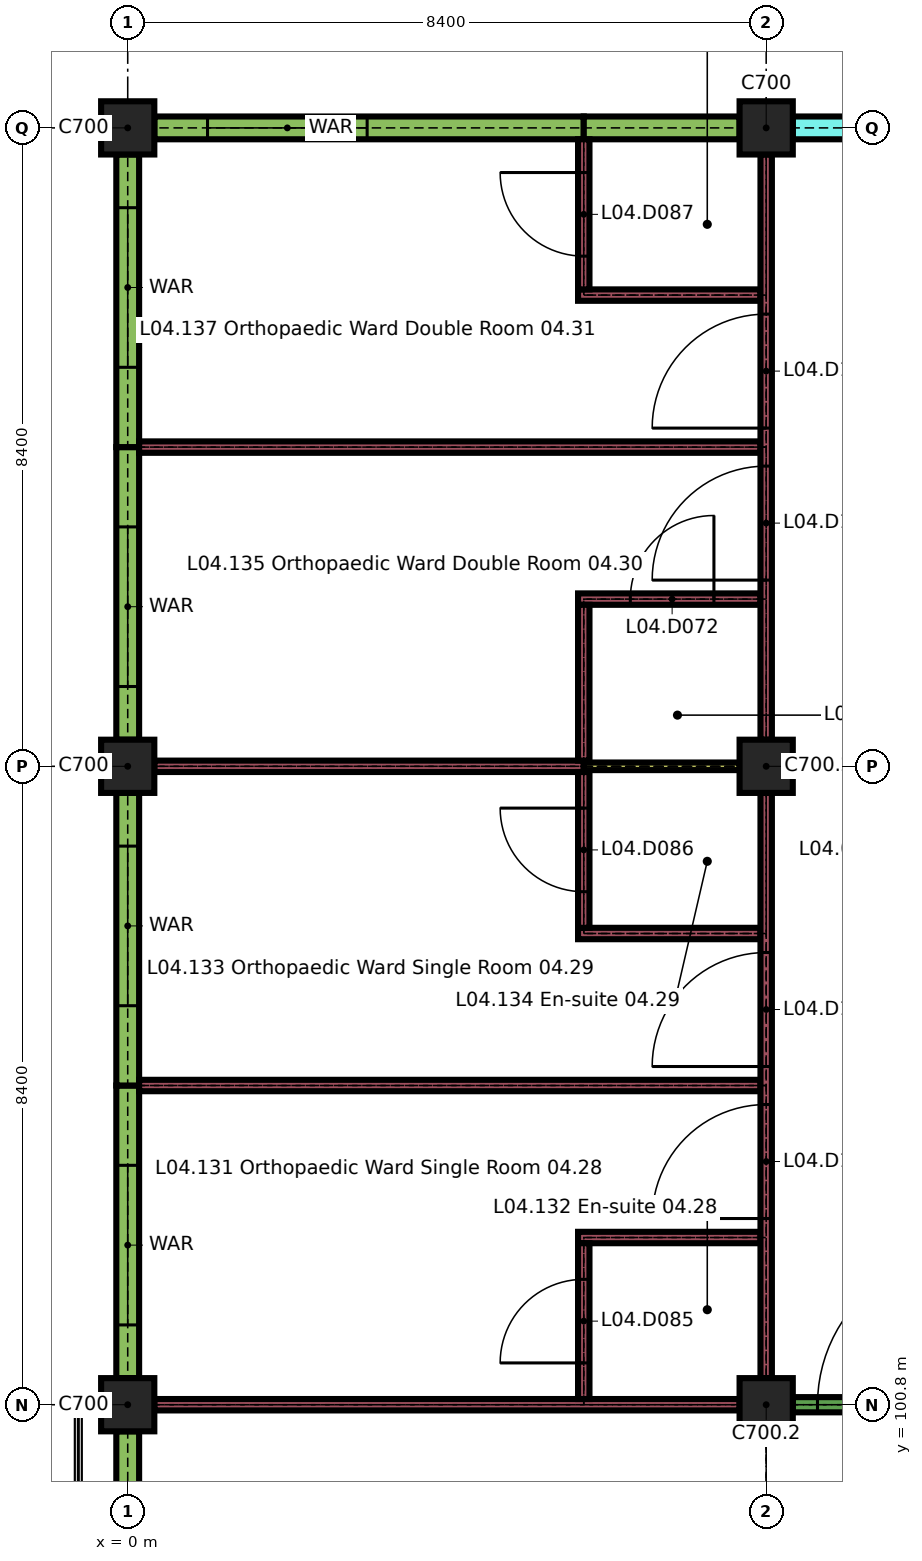
"""IFC4 building model, lengths in metres.
Left out: names, types, materials, properties, quantities, classifications, styles, units other than length and angle.
Written with IfcOpenShell. Run it as: python <this file> out.ifc"""

import sys

from ifc_helpers import new_model, si_unit, direction, frame, frame_2d, origin, origin_2d, place, context, subcontext, project, spatial, rectangle, extrude, element, fill, save


model = new_model("IFC4")
c1 = context("Model", 3, precision=1e-05, world=origin(), true_north=direction((0.0, 1.0)))
c2 = subcontext(c1, "Body", "Model", "MODEL_VIEW")
j1 = project(units=[si_unit("LENGTHUNIT", "METRE"), si_unit("PLANEANGLEUNIT", "RADIAN")], contexts=[c1])
p1 = place(None, origin())
s1 = spatial("IfcSite", under=j1, at=p1, CompositionType="ELEMENT")
p2 = place(p1, origin())
s2 = spatial("IfcBuilding", under=s1, at=p2, CompositionType="ELEMENT")
p3 = place(p2, frame((0.0, 0.0, 18.9)))
s3 = spatial("IfcBuildingStorey", under=s2, at=p3, CompositionType="ELEMENT", Elevation=18.9)
for number, where, z_axis, x_axis in (
    (1, (0.0, 100.8, 0.0), (0.0, 0.0, 1.0), (1.0, 0.0, 0.0)),
    (2, (8.4, 100.8, 0.0), (0.0, 0.0, 1.0), (1.0, 0.0, 0.0)),
    (3, (0.0, 109.2, 0.0), (0.0, 0.0, 1.0), (1.0, 0.0, 0.0)),
    (4, (8.4, 109.2, 0.0), (0.0, 0.0, 1.0), (1.0, 0.0, 0.0)),
    (5, (0.0, 117.6, 0.0), (0.0, 0.0, 1.0), (1.0, 0.0, 0.0)),
    (6, (8.4, 117.6, 0.0), (0.0, 0.0, 1.0), (1.0, 0.0, 0.0)),
):
    element("IfcColumn", number, at=place(p3, frame(where, z_axis=z_axis, x_axis=x_axis)), inside=s3, PredefinedType="COLUMN", context=c2, shape_type="SweptSolid", body=[
        extrude(rectangle(XDim=0.7, YDim=0.7, at=origin_2d()), origin(), (0.0, 0.0, 1.0), 3.26),
    ])
p4 = place(p3, frame((0.35, 117.6, 0.0), z_axis=(0.0, 0.0, 1.0), x_axis=(1.0, 0.0, 0.0)))
e7 = element("IfcWall", 7, at=p4, inside=s3, PredefinedType="SOLIDWALL", context=c2, shape_type="SweptSolid", body=[
    extrude(rectangle(XDim=5.65, YDim=0.3, at=frame_2d((2.825, 0.0))), origin(), (0.0, 0.0, 1.0), 2.96),
])
p5 = place(p4, frame((0.7, 0.0, 0.9)))
e8 = element("IfcOpeningElement", 8, at=p5, cuts=e7, PredefinedType="OPENING", context=c2, shape_type="SweptSolid", body=[
    extrude(rectangle(XDim=2.1, YDim=1.5, at=frame_2d((1.05, 0.75))), frame((0.0, 0.16, 0.0), z_axis=(0.0, -1.0, 0.0), x_axis=(1.0, 0.0, 0.0)), (0.0, 0.0, 1.0), 0.32),
])
p6 = place(p3, frame((6.0, 117.6, 0.0), z_axis=(0.0, 0.0, 1.0), x_axis=(1.0, 0.0, 0.0)))
e9 = element("IfcWall", 9, at=p6, inside=s3, PredefinedType="SOLIDWALL", context=c2, shape_type="SweptSolid", body=[
    extrude(rectangle(XDim=2.05, YDim=0.3, at=frame_2d((1.025, 0.0))), origin(), (0.0, 0.0, 1.0), 2.96),
])
p7 = place(p3, frame((8.75, 117.6, 0.0), z_axis=(0.0, 0.0, 1.0), x_axis=(1.0, 0.0, 0.0)))
e10 = element("IfcWall", 10, at=p7, inside=s3, PredefinedType="SOLIDWALL", context=c2, shape_type="SweptSolid", body=[
    extrude(rectangle(XDim=2.65, YDim=0.3, at=frame_2d((1.325, 0.0))), origin(), (0.0, 0.0, 1.0), 3.26),
])
p8 = place(p7, frame((1.3, 0.0, 0.9)))
e11 = element("IfcOpeningElement", 11, at=p8, cuts=e10, PredefinedType="OPENING", context=c2, shape_type="SweptSolid", body=[
    extrude(rectangle(XDim=0.9, YDim=1.5, at=frame_2d((0.45, 0.75))), frame((0.0, 0.16, 0.0), z_axis=(0.0, -1.0, 0.0), x_axis=(1.0, 0.0, 0.0)), (0.0, 0.0, 1.0), 0.32),
])
p9 = place(p3, frame((0.0, 99.4, 0.0), z_axis=(0.0, 0.0, 1.0), x_axis=(0.0, 1.0, 0.0)))
e12 = element("IfcWall", 12, at=p9, inside=s3, PredefinedType="SOLIDWALL", context=c2, shape_type="SweptSolid", body=[
    extrude(rectangle(XDim=1.05, YDim=0.3, at=frame_2d((0.525, 0.0))), origin(), (0.0, 0.0, 1.0), 2.96),
])
p10 = place(p3, frame((0.0, 101.15, 0.0), z_axis=(0.0, 0.0, 1.0), x_axis=(0.0, 1.0, 0.0)))
e13 = element("IfcWall", 13, at=p10, inside=s3, PredefinedType="SOLIDWALL", context=c2, shape_type="SweptSolid", body=[
    extrude(rectangle(XDim=3.85, YDim=0.3, at=frame_2d((1.925, 0.0))), origin(), (0.0, 0.0, 1.0), 2.96),
])
p11 = place(p10, frame((0.7, 0.0, 0.9)))
e14 = element("IfcOpeningElement", 14, at=p11, cuts=e13, PredefinedType="OPENING", context=c2, shape_type="SweptSolid", body=[
    extrude(rectangle(XDim=2.1, YDim=1.5, at=frame_2d((1.05, 0.75))), frame((0.0, 0.16, 0.0), z_axis=(0.0, -1.0, 0.0), x_axis=(1.0, 0.0, 0.0)), (0.0, 0.0, 1.0), 0.32),
])
p12 = place(p3, frame((0.0, 105.0, 0.0), z_axis=(0.0, 0.0, 1.0), x_axis=(0.0, 1.0, 0.0)))
e15 = element("IfcWall", 15, at=p12, inside=s3, PredefinedType="SOLIDWALL", context=c2, shape_type="SweptSolid", body=[
    extrude(rectangle(XDim=3.85, YDim=0.3, at=frame_2d((1.925, 0.0))), origin(), (0.0, 0.0, 1.0), 2.96),
])
p13 = place(p12, frame((1.05, 0.0, 0.9)))
e16 = element("IfcOpeningElement", 16, at=p13, cuts=e15, PredefinedType="OPENING", context=c2, shape_type="SweptSolid", body=[
    extrude(rectangle(XDim=2.1, YDim=1.5, at=frame_2d((1.05, 0.75))), frame((0.0, 0.16, 0.0), z_axis=(0.0, -1.0, 0.0), x_axis=(1.0, 0.0, 0.0)), (0.0, 0.0, 1.0), 0.32),
])
p14 = place(p3, frame((0.0, 109.55, 0.0), z_axis=(0.0, 0.0, 1.0), x_axis=(0.0, 1.0, 0.0)))
e17 = element("IfcWall", 17, at=p14, inside=s3, PredefinedType="SOLIDWALL", context=c2, shape_type="SweptSolid", body=[
    extrude(rectangle(XDim=3.85, YDim=0.3, at=frame_2d((1.925, 0.0))), origin(), (0.0, 0.0, 1.0), 2.96),
])
p15 = place(p14, frame((0.7, 0.0, 0.9)))
e18 = element("IfcOpeningElement", 18, at=p15, cuts=e17, PredefinedType="OPENING", context=c2, shape_type="SweptSolid", body=[
    extrude(rectangle(XDim=2.1, YDim=1.5, at=frame_2d((1.05, 0.75))), frame((0.0, 0.16, 0.0), z_axis=(0.0, -1.0, 0.0), x_axis=(1.0, 0.0, 0.0)), (0.0, 0.0, 1.0), 0.32),
])
p16 = place(p3, frame((0.0, 113.4, 0.0), z_axis=(0.0, 0.0, 1.0), x_axis=(0.0, 1.0, 0.0)))
e19 = element("IfcWall", 19, at=p16, inside=s3, PredefinedType="SOLIDWALL", context=c2, shape_type="SweptSolid", body=[
    extrude(rectangle(XDim=3.85, YDim=0.3, at=frame_2d((1.925, 0.0))), origin(), (0.0, 0.0, 1.0), 2.96),
])
p17 = place(p16, frame((1.05, 0.0, 0.9)))
e20 = element("IfcOpeningElement", 20, at=p17, cuts=e19, PredefinedType="OPENING", context=c2, shape_type="SweptSolid", body=[
    extrude(rectangle(XDim=2.1, YDim=1.5, at=frame_2d((1.05, 0.75))), frame((0.0, 0.16, 0.0), z_axis=(0.0, -1.0, 0.0), x_axis=(1.0, 0.0, 0.0)), (0.0, 0.0, 1.0), 0.32),
])
p18 = place(p3, frame((0.35, 100.8, 0.0), z_axis=(0.0, 0.0, 1.0), x_axis=(1.0, 0.0, 0.0)))
e21 = element("IfcWall", 21, at=p18, inside=s3, PredefinedType="PARTITIONING", context=c2, shape_type="SweptSolid", body=[
    extrude(rectangle(XDim=7.7, YDim=0.15, at=frame_2d((3.85, 0.0))), origin(), (0.0, 0.0, 1.0), 3.26),
])
p19 = place(p3, frame((8.75, 100.8, 0.0), z_axis=(0.0, 0.0, 1.0), x_axis=(1.0, 0.0, 0.0)))
e22 = element("IfcWall", 22, at=p19, inside=s3, PredefinedType="PARTITIONING", context=c2, shape_type="SweptSolid", body=[
    extrude(rectangle(XDim=7.7, YDim=0.2, at=frame_2d((3.85, 0.0))), origin(), (0.0, 0.0, 1.0), 3.26),
])
p20 = place(p19, frame((0.325, 0.0, 0.0)))
e23 = element("IfcOpeningElement", 23, at=p20, cuts=e22, PredefinedType="OPENING", context=c2, shape_type="SweptSolid", body=[
    extrude(rectangle(XDim=2.0, YDim=2.4, at=frame_2d((1.0, 1.2))), frame((0.0, 0.11, 0.0), z_axis=(0.0, -1.0, 0.0), x_axis=(1.0, 0.0, 0.0)), (0.0, 0.0, 1.0), 0.22),
])
p21 = place(p19, frame((5.375, 0.0, 0.0)))
e24 = element("IfcOpeningElement", 24, at=p21, cuts=e22, PredefinedType="OPENING", context=c2, shape_type="SweptSolid", body=[
    extrude(rectangle(XDim=2.0, YDim=2.4, at=frame_2d((1.0, 1.2))), frame((0.0, 0.11, 0.0), z_axis=(0.0, -1.0, 0.0), x_axis=(1.0, 0.0, 0.0)), (0.0, 0.0, 1.0), 0.22),
])
p22 = place(p3, frame((5.925, 103.0, 0.0), z_axis=(0.0, 0.0, 1.0), x_axis=(1.0, 0.0, 0.0)))
e25 = element("IfcWall", 25, at=p22, inside=s3, PredefinedType="PARTITIONING", context=c2, shape_type="SweptSolid", body=[
    extrude(rectangle(XDim=2.4, YDim=0.15, at=frame_2d((1.2, 0.0))), origin(), (0.0, 0.0, 1.0), 3.26),
])
p23 = place(p3, frame((0.15, 105.0, 0.0), z_axis=(0.0, 0.0, 1.0), x_axis=(1.0, 0.0, 0.0)))
e26 = element("IfcWall", 26, at=p23, inside=s3, PredefinedType="PARTITIONING", context=c2, shape_type="SweptSolid", body=[
    extrude(rectangle(XDim=8.175, YDim=0.15, at=frame_2d((4.087, 0.0))), origin(), (0.0, 0.0, 1.0), 3.26),
])
p24 = place(p3, frame((5.925, 107.0, 0.0), z_axis=(0.0, 0.0, 1.0), x_axis=(1.0, 0.0, 0.0)))
e27 = element("IfcWall", 27, at=p24, inside=s3, PredefinedType="PARTITIONING", context=c2, shape_type="SweptSolid", body=[
    extrude(rectangle(XDim=2.4, YDim=0.15, at=frame_2d((1.2, 0.0))), origin(), (0.0, 0.0, 1.0), 3.26),
])
p25 = place(p3, frame((0.35, 109.2, 0.0), z_axis=(0.0, 0.0, 1.0), x_axis=(1.0, 0.0, 0.0)))
e28 = element("IfcWall", 28, at=p25, inside=s3, PredefinedType="PARTITIONING", context=c2, shape_type="SweptSolid", body=[
    extrude(rectangle(XDim=5.65, YDim=0.15, at=frame_2d((2.825, 0.0))), origin(), (0.0, 0.0, 1.0), 3.26),
])
p26 = place(p3, frame((6.0, 109.2, 0.0), z_axis=(0.0, 0.0, 1.0), x_axis=(1.0, 0.0, 0.0)))
e29 = element("IfcWall", 29, at=p26, inside=s3, PredefinedType="PARTITIONING", context=c2, shape_type="SweptSolid", body=[
    extrude(rectangle(XDim=2.05, YDim=0.1, at=frame_2d((1.025, 0.0))), origin(), (0.0, 0.0, 1.0), 3.26),
])
p27 = place(p3, frame((5.925, 111.4, 0.0), z_axis=(0.0, 0.0, 1.0), x_axis=(1.0, 0.0, 0.0)))
e30 = element("IfcWall", 30, at=p27, inside=s3, PredefinedType="PARTITIONING", context=c2, shape_type="SweptSolid", body=[
    extrude(rectangle(XDim=2.4, YDim=0.15, at=frame_2d((1.2, 0.0))), origin(), (0.0, 0.0, 1.0), 3.26),
])
p28 = place(p27, frame((0.688, 0.0, 0.0)))
e31 = element("IfcOpeningElement", 31, at=p28, cuts=e30, PredefinedType="OPENING", context=c2, shape_type="SweptSolid", body=[
    extrude(rectangle(XDim=1.1, YDim=2.1, at=frame_2d((0.55, 1.05))), frame((0.0, 0.085, 0.0), z_axis=(0.0, -1.0, 0.0), x_axis=(1.0, 0.0, 0.0)), (0.0, 0.0, 1.0), 0.17),
])
p29 = place(p3, frame((0.15, 113.4, 0.0), z_axis=(0.0, 0.0, 1.0), x_axis=(1.0, 0.0, 0.0)))
e32 = element("IfcWall", 32, at=p29, inside=s3, PredefinedType="PARTITIONING", context=c2, shape_type="SweptSolid", body=[
    extrude(rectangle(XDim=8.175, YDim=0.15, at=frame_2d((4.087, 0.0))), origin(), (0.0, 0.0, 1.0), 3.26),
])
p30 = place(p3, frame((5.925, 115.4, 0.0), z_axis=(0.0, 0.0, 1.0), x_axis=(1.0, 0.0, 0.0)))
e33 = element("IfcWall", 33, at=p30, inside=s3, PredefinedType="PARTITIONING", context=c2, shape_type="SweptSolid", body=[
    extrude(rectangle(XDim=2.4, YDim=0.15, at=frame_2d((1.2, 0.0))), origin(), (0.0, 0.0, 1.0), 3.26),
])
p31 = place(p3, frame((6.0, 100.875, 0.0), z_axis=(0.0, 0.0, 1.0), x_axis=(0.0, 1.0, 0.0)))
e34 = element("IfcWall", 34, at=p31, inside=s3, PredefinedType="PARTITIONING", context=c2, shape_type="SweptSolid", body=[
    extrude(rectangle(XDim=2.05, YDim=0.15, at=frame_2d((1.025, 0.0))), origin(), (0.0, 0.0, 1.0), 3.26),
])
p32 = place(p31, frame((0.475, 0.0, 0.0)))
e35 = element("IfcOpeningElement", 35, at=p32, cuts=e34, PredefinedType="OPENING", context=c2, shape_type="SweptSolid", body=[
    extrude(rectangle(XDim=1.1, YDim=2.1, at=frame_2d((0.55, 1.05))), frame((0.0, 0.085, 0.0), z_axis=(0.0, -1.0, 0.0), x_axis=(1.0, 0.0, 0.0)), (0.0, 0.0, 1.0), 0.17),
])
p33 = place(p3, frame((6.0, 107.075, 0.0), z_axis=(0.0, 0.0, 1.0), x_axis=(0.0, 1.0, 0.0)))
e36 = element("IfcWall", 36, at=p33, inside=s3, PredefinedType="PARTITIONING", context=c2, shape_type="SweptSolid", body=[
    extrude(rectangle(XDim=2.05, YDim=0.15, at=frame_2d((1.025, 0.0))), origin(), (0.0, 0.0, 1.0), 3.26),
])
p34 = place(p33, frame((0.475, 0.0, 0.0)))
e37 = element("IfcOpeningElement", 37, at=p34, cuts=e36, PredefinedType="OPENING", context=c2, shape_type="SweptSolid", body=[
    extrude(rectangle(XDim=1.1, YDim=2.1, at=frame_2d((0.55, 1.05))), frame((0.0, 0.085, 0.0), z_axis=(0.0, -1.0, 0.0), x_axis=(1.0, 0.0, 0.0)), (0.0, 0.0, 1.0), 0.17),
])
p35 = place(p3, frame((6.0, 109.275, 0.0), z_axis=(0.0, 0.0, 1.0), x_axis=(0.0, 1.0, 0.0)))
e38 = element("IfcWall", 38, at=p35, inside=s3, PredefinedType="PARTITIONING", context=c2, shape_type="SweptSolid", body=[
    extrude(rectangle(XDim=2.05, YDim=0.15, at=frame_2d((1.025, 0.0))), origin(), (0.0, 0.0, 1.0), 3.26),
])
p36 = place(p3, frame((6.0, 115.475, 0.0), z_axis=(0.0, 0.0, 1.0), x_axis=(0.0, 1.0, 0.0)))
e39 = element("IfcWall", 39, at=p36, inside=s3, PredefinedType="PARTITIONING", context=c2, shape_type="SweptSolid", body=[
    extrude(rectangle(XDim=1.975, YDim=0.15, at=frame_2d((0.987, 0.0))), origin(), (0.0, 0.0, 1.0), 3.26),
])
p37 = place(p36, frame((0.438, 0.0, 0.0)))
e40 = element("IfcOpeningElement", 40, at=p37, cuts=e39, PredefinedType="OPENING", context=c2, shape_type="SweptSolid", body=[
    extrude(rectangle(XDim=1.1, YDim=2.1, at=frame_2d((0.55, 1.05))), frame((0.0, 0.085, 0.0), z_axis=(0.0, -1.0, 0.0), x_axis=(1.0, 0.0, 0.0)), (0.0, 0.0, 1.0), 0.17),
])
p38 = place(p3, frame((8.4, 101.15, 0.0), z_axis=(0.0, 0.0, 1.0), x_axis=(0.0, 1.0, 0.0)))
e41 = element("IfcWall", 41, at=p38, inside=s3, PredefinedType="PARTITIONING", context=c2, shape_type="SweptSolid", body=[
    extrude(rectangle(XDim=7.7, YDim=0.15, at=frame_2d((3.85, 0.0))), origin(), (0.0, 0.0, 1.0), 3.26),
])
p39 = place(p38, frame((2.1, 0.0, 0.0)))
e42 = element("IfcOpeningElement", 42, at=p39, cuts=e41, PredefinedType="OPENING", context=c2, shape_type="SweptSolid", body=[
    extrude(rectangle(XDim=1.5, YDim=2.4, at=frame_2d((0.75, 1.2))), frame((0.0, 0.085, 0.0), z_axis=(0.0, -1.0, 0.0), x_axis=(1.0, 0.0, 0.0)), (0.0, 0.0, 1.0), 0.17),
])
p40 = place(p38, frame((4.1, 0.0, 0.0)))
e43 = element("IfcOpeningElement", 43, at=p40, cuts=e41, PredefinedType="OPENING", context=c2, shape_type="SweptSolid", body=[
    extrude(rectangle(XDim=1.5, YDim=2.4, at=frame_2d((0.75, 1.2))), frame((0.0, 0.085, 0.0), z_axis=(0.0, -1.0, 0.0), x_axis=(1.0, 0.0, 0.0)), (0.0, 0.0, 1.0), 0.17),
])
p41 = place(p3, frame((8.4, 109.55, 0.0), z_axis=(0.0, 0.0, 1.0), x_axis=(0.0, 1.0, 0.0)))
e44 = element("IfcWall", 44, at=p41, inside=s3, PredefinedType="PARTITIONING", context=c2, shape_type="SweptSolid", body=[
    extrude(rectangle(XDim=7.7, YDim=0.15, at=frame_2d((3.85, 0.0))), origin(), (0.0, 0.0, 1.0), 3.26),
])
p42 = place(p41, frame((2.1, 0.0, 0.0)))
e45 = element("IfcOpeningElement", 45, at=p42, cuts=e44, PredefinedType="OPENING", context=c2, shape_type="SweptSolid", body=[
    extrude(rectangle(XDim=1.5, YDim=2.4, at=frame_2d((0.75, 1.2))), frame((0.0, 0.085, 0.0), z_axis=(0.0, -1.0, 0.0), x_axis=(1.0, 0.0, 0.0)), (0.0, 0.0, 1.0), 0.17),
])
p43 = place(p41, frame((4.1, 0.0, 0.0)))
e46 = element("IfcOpeningElement", 46, at=p43, cuts=e44, PredefinedType="OPENING", context=c2, shape_type="SweptSolid", body=[
    extrude(rectangle(XDim=1.5, YDim=2.4, at=frame_2d((0.75, 1.2))), frame((0.0, 0.085, 0.0), z_axis=(0.0, -1.0, 0.0), x_axis=(1.0, 0.0, 0.0)), (0.0, 0.0, 1.0), 0.17),
])
p44 = place(p5, origin())
e47 = element("IfcWindow", 47, at=p44, inside=s3, PartitioningType="DOUBLE_PANEL_VERTICAL", PredefinedType="WINDOW", context=c2, shape_type="SweptSolid", body=[
    extrude(rectangle(XDim=2.1, YDim=1.5, at=frame_2d((1.05, 0.75))), frame((0.0, 0.05, 0.0), z_axis=(0.0, -1.0, 0.0), x_axis=(1.0, 0.0, 0.0)), (0.0, 0.0, 1.0), 0.1),
])
fill(e8, e47)
p45 = place(p11, origin())
e48 = element("IfcWindow", 48, at=p45, inside=s3, PartitioningType="DOUBLE_PANEL_VERTICAL", PredefinedType="WINDOW", context=c2, shape_type="SweptSolid", body=[
    extrude(rectangle(XDim=2.1, YDim=1.5, at=frame_2d((1.05, 0.75))), frame((0.0, 0.05, 0.0), z_axis=(0.0, -1.0, 0.0), x_axis=(1.0, 0.0, 0.0)), (0.0, 0.0, 1.0), 0.1),
])
fill(e14, e48)
p46 = place(p13, origin())
e49 = element("IfcWindow", 49, at=p46, inside=s3, PartitioningType="DOUBLE_PANEL_VERTICAL", PredefinedType="WINDOW", context=c2, shape_type="SweptSolid", body=[
    extrude(rectangle(XDim=2.1, YDim=1.5, at=frame_2d((1.05, 0.75))), frame((0.0, 0.05, 0.0), z_axis=(0.0, -1.0, 0.0), x_axis=(1.0, 0.0, 0.0)), (0.0, 0.0, 1.0), 0.1),
])
fill(e16, e49)
p47 = place(p15, origin())
e50 = element("IfcWindow", 50, at=p47, inside=s3, PartitioningType="DOUBLE_PANEL_VERTICAL", PredefinedType="WINDOW", context=c2, shape_type="SweptSolid", body=[
    extrude(rectangle(XDim=2.1, YDim=1.5, at=frame_2d((1.05, 0.75))), frame((0.0, 0.05, 0.0), z_axis=(0.0, -1.0, 0.0), x_axis=(1.0, 0.0, 0.0)), (0.0, 0.0, 1.0), 0.1),
])
fill(e18, e50)
p48 = place(p17, origin())
e51 = element("IfcWindow", 51, at=p48, inside=s3, PartitioningType="DOUBLE_PANEL_VERTICAL", PredefinedType="WINDOW", context=c2, shape_type="SweptSolid", body=[
    extrude(rectangle(XDim=2.1, YDim=1.5, at=frame_2d((1.05, 0.75))), frame((0.0, 0.05, 0.0), z_axis=(0.0, -1.0, 0.0), x_axis=(1.0, 0.0, 0.0)), (0.0, 0.0, 1.0), 0.1),
])
fill(e20, e51)
p49 = place(p20, origin())
e52 = element("IfcDoor", 52, at=p49, inside=s3, OperationType="SINGLE_SWING_LEFT", PredefinedType="DOOR", context=c2, shape_type="SweptSolid", body=[
    extrude(rectangle(XDim=2.0, YDim=2.4, at=frame_2d((1.0, 1.2))), frame((0.0, 0.03, 0.0), z_axis=(0.0, -1.0, 0.0), x_axis=(1.0, 0.0, 0.0)), (0.0, 0.0, 1.0), 0.06),
])
fill(e23, e52)
p50 = place(p28, origin())
e53 = element("IfcDoor", 53, at=p50, inside=s3, OperationType="SINGLE_SWING_LEFT", PredefinedType="DOOR", context=c2, shape_type="SweptSolid", body=[
    extrude(rectangle(XDim=1.1, YDim=2.1, at=frame_2d((0.55, 1.05))), frame((0.0, 0.025, 0.0), z_axis=(0.0, -1.0, 0.0), x_axis=(1.0, 0.0, 0.0)), (0.0, 0.0, 1.0), 0.05),
])
fill(e31, e53)
p51 = place(p32, origin())
e54 = element("IfcDoor", 54, at=p51, inside=s3, OperationType="SINGLE_SWING_RIGHT", PredefinedType="DOOR", context=c2, shape_type="SweptSolid", body=[
    extrude(rectangle(XDim=1.1, YDim=2.1, at=frame_2d((0.55, 1.05))), frame((0.0, 0.025, 0.0), z_axis=(0.0, -1.0, 0.0), x_axis=(1.0, 0.0, 0.0)), (0.0, 0.0, 1.0), 0.05),
])
fill(e35, e54)
p52 = place(p34, origin())
e55 = element("IfcDoor", 55, at=p52, inside=s3, OperationType="SINGLE_SWING_LEFT", PredefinedType="DOOR", context=c2, shape_type="SweptSolid", body=[
    extrude(rectangle(XDim=1.1, YDim=2.1, at=frame_2d((0.55, 1.05))), frame((0.0, 0.025, 0.0), z_axis=(0.0, -1.0, 0.0), x_axis=(1.0, 0.0, 0.0)), (0.0, 0.0, 1.0), 0.05),
])
fill(e37, e55)
p53 = place(p37, origin())
e56 = element("IfcDoor", 56, at=p53, inside=s3, OperationType="SINGLE_SWING_LEFT", PredefinedType="DOOR", context=c2, shape_type="SweptSolid", body=[
    extrude(rectangle(XDim=1.1, YDim=2.1, at=frame_2d((0.55, 1.05))), frame((0.0, 0.025, 0.0), z_axis=(0.0, -1.0, 0.0), x_axis=(1.0, 0.0, 0.0)), (0.0, 0.0, 1.0), 0.05),
])
fill(e40, e56)
p54 = place(p39, origin())
e57 = element("IfcDoor", 57, at=p54, inside=s3, OperationType="SINGLE_SWING_RIGHT", PredefinedType="DOOR", context=c2, shape_type="SweptSolid", body=[
    extrude(rectangle(XDim=1.5, YDim=2.4, at=frame_2d((0.75, 1.2))), frame((0.0, 0.03, 0.0), z_axis=(0.0, -1.0, 0.0), x_axis=(1.0, 0.0, 0.0)), (0.0, 0.0, 1.0), 0.06),
])
fill(e42, e57)
p55 = place(p40, origin())
e58 = element("IfcDoor", 58, at=p55, inside=s3, OperationType="SINGLE_SWING_RIGHT", PredefinedType="DOOR", context=c2, shape_type="SweptSolid", body=[
    extrude(rectangle(XDim=1.5, YDim=2.4, at=frame_2d((0.75, 1.2))), frame((0.0, 0.03, 0.0), z_axis=(0.0, -1.0, 0.0), x_axis=(1.0, 0.0, 0.0)), (0.0, 0.0, 1.0), 0.06),
])
fill(e43, e58)
p56 = place(p42, origin())
e59 = element("IfcDoor", 59, at=p56, inside=s3, OperationType="SINGLE_SWING_RIGHT", PredefinedType="DOOR", context=c2, shape_type="SweptSolid", body=[
    extrude(rectangle(XDim=1.5, YDim=2.4, at=frame_2d((0.75, 1.2))), frame((0.0, 0.03, 0.0), z_axis=(0.0, -1.0, 0.0), x_axis=(1.0, 0.0, 0.0)), (0.0, 0.0, 1.0), 0.06),
])
fill(e45, e59)
p57 = place(p43, origin())
e60 = element("IfcDoor", 60, at=p57, inside=s3, OperationType="SINGLE_SWING_RIGHT", PredefinedType="DOOR", context=c2, shape_type="SweptSolid", body=[
    extrude(rectangle(XDim=1.5, YDim=2.4, at=frame_2d((0.75, 1.2))), frame((0.0, 0.03, 0.0), z_axis=(0.0, -1.0, 0.0), x_axis=(1.0, 0.0, 0.0)), (0.0, 0.0, 1.0), 0.06),
])
fill(e46, e60)
save(model, sys.argv[1])
